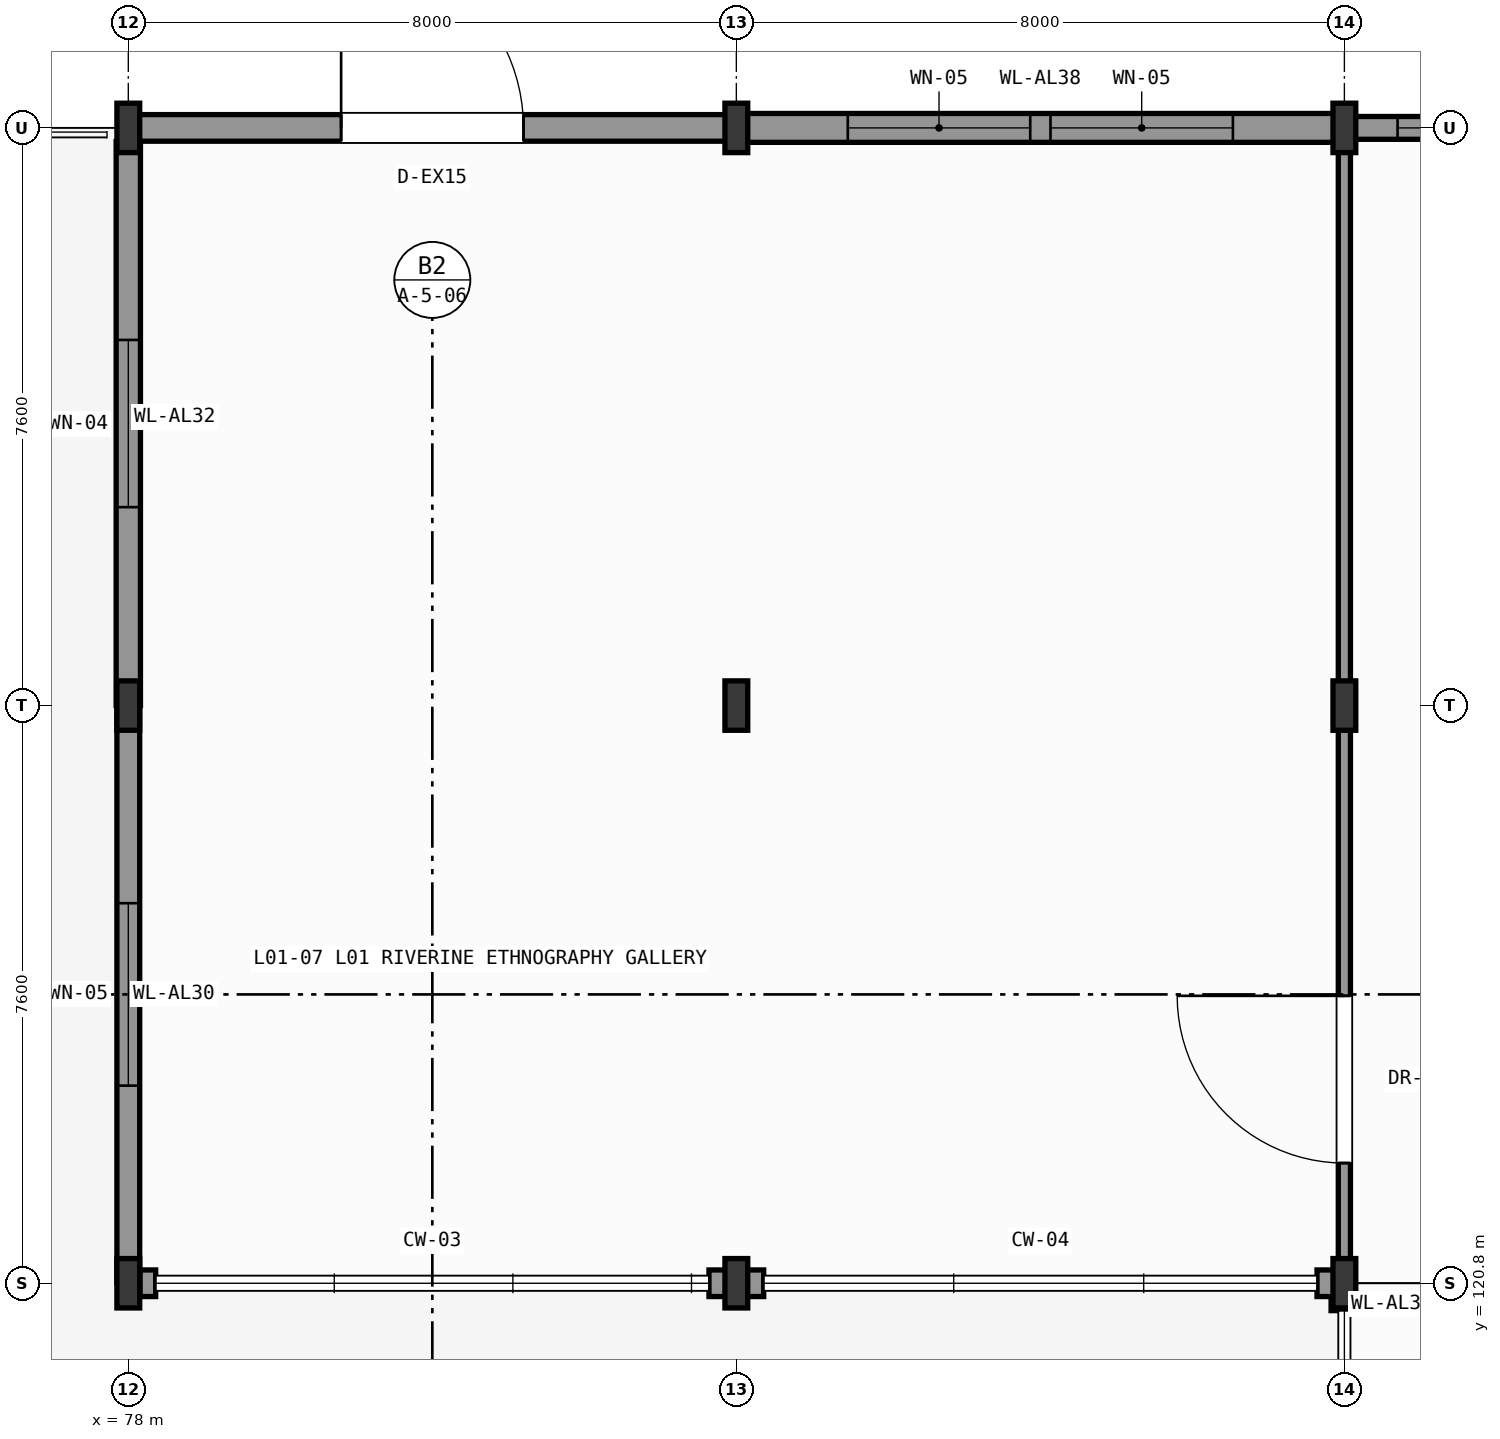
"""IFC4 building model, lengths in metres.
Left out: names, types, materials, properties, quantities, classifications, styles, units other than length and angle.
Written with IfcOpenShell. Run it as: python <this file> out.ifc"""

import sys

from ifc_helpers import new_model, si_unit, direction, frame, frame_2d, origin, origin_2d, place, context, subcontext, project, spatial, rectangle, i_section, extrude, element, fill, save


model = new_model("IFC4")
c1 = context("Model", 3, precision=1e-05, world=origin(), true_north=direction((0.0, 1.0)))
c2 = subcontext(c1, "Body", "Model", "MODEL_VIEW")
j1 = project(units=[si_unit("LENGTHUNIT", "METRE"), si_unit("PLANEANGLEUNIT", "RADIAN")], contexts=[c1])
p1 = place(None, origin())
s1 = spatial("IfcSite", under=j1, at=p1, CompositionType="ELEMENT")
p2 = place(p1, origin())
s2 = spatial("IfcBuilding", under=s1, at=p2, CompositionType="ELEMENT")
p3 = place(p2, origin())
s3 = spatial("IfcBuildingStorey", under=s2, at=p3, CompositionType="ELEMENT", Elevation=0.0)
for number, where, z_axis, x_axis in (
    (1, (78.0, 120.8, 0.0), (0.0, 0.0, 1.0), (1.0, 0.0, 0.0)),
    (2, (78.0, 128.4, 0.0), (0.0, 0.0, 1.0), (1.0, 0.0, 0.0)),
    (3, (78.0, 136.0, 0.0), (0.0, 0.0, 1.0), (1.0, 0.0, 0.0)),
    (4, (86.0, 120.8, 0.0), (0.0, 0.0, 1.0), (1.0, 0.0, 0.0)),
    (5, (86.0, 128.4, 0.0), (0.0, 0.0, 1.0), (1.0, 0.0, 0.0)),
    (6, (86.0, 136.0, 0.0), (0.0, 0.0, 1.0), (1.0, 0.0, 0.0)),
    (7, (94.0, 120.8, 0.0), (0.0, 0.0, 1.0), (1.0, 0.0, 0.0)),
    (8, (94.0, 128.4, 0.0), (0.0, 0.0, 1.0), (1.0, 0.0, 0.0)),
    (9, (94.0, 136.0, 0.0), (0.0, 0.0, 1.0), (1.0, 0.0, 0.0)),
):
    element("IfcColumn", number, at=place(p3, frame(where, z_axis=z_axis, x_axis=x_axis)), inside=s3, PredefinedType="COLUMN", context=c2, shape_type="SweptSolid", body=[
        extrude(i_section(OverallWidth=0.3, OverallDepth=0.65, WebThickness=0.016, FlangeThickness=0.031, FilletRadius=0.027, at=origin_2d()), origin(), (0.0, 0.0, 1.0), 7.8),
    ])
p4 = place(p3, frame((94.0, 136.0, 0.0), z_axis=(0.0, 0.0, 1.0), x_axis=(1.0, 0.0, 0.0)))
e10 = element("IfcWall", 10, at=p4, inside=s3, PredefinedType="SOLIDWALL", context=c2, shape_type="SweptSolid", body=[
    extrude(rectangle(XDim=8.0, YDim=0.3, at=frame_2d((4.0, 0.0))), origin(), (0.0, 0.0, 1.0), 7.135),
])
p5 = place(p4, frame((0.7, 0.0, 0.95)))
e11 = element("IfcOpeningElement", 11, at=p5, cuts=e10, PredefinedType="OPENING", context=c2, shape_type="SweptSolid", body=[
    extrude(rectangle(XDim=2.4, YDim=3.0, at=frame_2d((1.2, 1.5))), frame((0.0, 0.16, 0.0), z_axis=(0.0, -1.0, 0.0), x_axis=(1.0, 0.0, 0.0)), (0.0, 0.0, 1.0), 0.32),
])
p6 = place(p4, frame((4.1, 0.0, 0.95)))
e12 = element("IfcOpeningElement", 12, at=p6, cuts=e10, PredefinedType="OPENING", context=c2, shape_type="SweptSolid", body=[
    extrude(rectangle(XDim=2.4, YDim=3.0, at=frame_2d((1.2, 1.5))), frame((0.0, 0.16, 0.0), z_axis=(0.0, -1.0, 0.0), x_axis=(1.0, 0.0, 0.0)), (0.0, 0.0, 1.0), 0.32),
])
p7 = place(p3, frame((86.0, 136.0, 0.0), z_axis=(0.0, 0.0, 1.0), x_axis=(1.0, 0.0, 0.0)))
e13 = element("IfcWall", 13, at=p7, inside=s3, PredefinedType="SOLIDWALL", context=c2, shape_type="SweptSolid", body=[
    extrude(rectangle(XDim=8.0, YDim=0.38, at=frame_2d((4.0, 0.0))), origin(), (0.0, 0.0, 1.0), 7.135),
])
p8 = place(p7, frame((1.467, 0.0, 0.95)))
e14 = element("IfcOpeningElement", 14, at=p8, cuts=e13, PredefinedType="OPENING", context=c2, shape_type="SweptSolid", body=[
    extrude(rectangle(XDim=2.4, YDim=4.6, at=frame_2d((1.2, 2.3))), frame((0.0, 0.2, 0.0), z_axis=(0.0, -1.0, 0.0), x_axis=(1.0, 0.0, 0.0)), (0.0, 0.0, 1.0), 0.4),
])
p9 = place(p7, frame((4.133, 0.0, 0.95)))
e15 = element("IfcOpeningElement", 15, at=p9, cuts=e13, PredefinedType="OPENING", context=c2, shape_type="SweptSolid", body=[
    extrude(rectangle(XDim=2.4, YDim=4.6, at=frame_2d((1.2, 2.3))), frame((0.0, 0.2, 0.0), z_axis=(0.0, -1.0, 0.0), x_axis=(1.0, 0.0, 0.0)), (0.0, 0.0, 1.0), 0.4),
])
p10 = place(p3, frame((78.0, 136.0, 0.0), z_axis=(0.0, 0.0, 1.0), x_axis=(1.0, 0.0, 0.0)))
e16 = element("IfcWall", 16, at=p10, inside=s3, PredefinedType="SOLIDWALL", context=c2, shape_type="SweptSolid", body=[
    extrude(rectangle(XDim=8.0, YDim=0.35, at=frame_2d((4.0, 0.0))), origin(), (0.0, 0.0, 1.0), 7.135),
])
p11 = place(p10, frame((2.8, 0.0, 0.0)))
e17 = element("IfcOpeningElement", 17, at=p11, cuts=e16, PredefinedType="OPENING", context=c2, shape_type="SweptSolid", body=[
    extrude(rectangle(XDim=2.4, YDim=2.8, at=frame_2d((1.2, 1.4))), frame((0.0, 0.185, 0.0), z_axis=(0.0, -1.0, 0.0), x_axis=(1.0, 0.0, 0.0)), (0.0, 0.0, 1.0), 0.37),
])
p12 = place(p3, frame((78.0, 128.4, 0.0), z_axis=(0.0, 0.0, 1.0), x_axis=(0.0, 1.0, 0.0)))
e18 = element("IfcWall", 18, at=p12, inside=s3, PredefinedType="SOLIDWALL", context=c2, shape_type="SweptSolid", body=[
    extrude(rectangle(XDim=7.421, YDim=0.32, at=frame_2d((3.71, 0.0))), origin(), (0.0, 0.0, 1.0), 7.025),
])
p13 = place(p12, frame((2.611, 0.0, 0.95)))
e19 = element("IfcOpeningElement", 19, at=p13, cuts=e18, PredefinedType="OPENING", context=c2, shape_type="SweptSolid", body=[
    extrude(rectangle(XDim=2.2, YDim=4.2, at=frame_2d((1.1, 2.1))), frame((0.0, 0.17, 0.0), z_axis=(0.0, -1.0, 0.0), x_axis=(1.0, 0.0, 0.0)), (0.0, 0.0, 1.0), 0.34),
])
p14 = place(p3, frame((78.0, 120.8, 0.0), z_axis=(0.0, 0.0, 1.0), x_axis=(0.0, 1.0, 0.0)))
e20 = element("IfcWall", 20, at=p14, inside=s3, PredefinedType="SOLIDWALL", context=c2, shape_type="SweptSolid", body=[
    extrude(rectangle(XDim=7.6, YDim=0.3, at=frame_2d((3.8, 0.0))), origin(), (0.0, 0.0, 1.0), 7.025),
])
p15 = place(p14, frame((2.6, 0.0, 0.95)))
e21 = element("IfcOpeningElement", 21, at=p15, cuts=e20, PredefinedType="OPENING", context=c2, shape_type="SweptSolid", body=[
    extrude(rectangle(XDim=2.4, YDim=4.6, at=frame_2d((1.2, 2.3))), frame((0.0, 0.16, 0.0), z_axis=(0.0, -1.0, 0.0), x_axis=(1.0, 0.0, 0.0)), (0.0, 0.0, 1.0), 0.32),
])
p16 = place(p3, frame((78.154, 120.8, 0.0), z_axis=(0.0, 0.0, 1.0), x_axis=(1.0, 0.0, 0.0)))
e22 = element("IfcWall", 22, at=p16, inside=s3, PredefinedType="SOLIDWALL", context=c2, shape_type="SweptSolid", body=[
    extrude(rectangle(XDim=0.206, YDim=0.35, at=frame_2d((0.103, 0.0))), origin(), (0.0, 0.0, 1.0), 7.54),
])
p17 = place(p3, frame((85.64, 120.8, 0.0), z_axis=(0.0, 0.0, 1.0), x_axis=(1.0, 0.0, 0.0)))
e23 = element("IfcWall", 23, at=p17, inside=s3, PredefinedType="SOLIDWALL", context=c2, shape_type="SweptSolid", body=[
    extrude(rectangle(XDim=0.36, YDim=0.35, at=frame_2d((0.18, 0.0))), origin(), (0.0, 0.0, 1.0), 7.295),
])
for number, where, z_axis, x_axis in (
    (24, (86.0, 120.8, 0.0), (0.0, 0.0, 1.0), (1.0, 0.0, 0.0)),
    (25, (93.64, 120.8, 0.0), (0.0, 0.0, 1.0), (1.0, 0.0, 0.0)),
):
    element("IfcWall", number, at=place(p3, frame(where, z_axis=z_axis, x_axis=x_axis)), inside=s3, PredefinedType="SOLIDWALL", context=c2, shape_type="SweptSolid", body=[
        extrude(rectangle(XDim=0.36, YDim=0.35, at=frame_2d((0.18, 0.0))), origin(), (0.0, 0.0, 1.0), 7.225),
    ])
p18 = place(p3, frame((94.0, 120.621, 0.0), z_axis=(0.0, 0.0, 1.0), x_axis=(0.0, -1.0, 0.0)))
e26 = element("IfcWall", 26, at=p18, inside=s3, PredefinedType="SOLIDWALL", context=c2, shape_type="SweptSolid", body=[
    extrude(rectangle(XDim=0.181, YDim=0.35, at=frame_2d((0.091, 0.0))), origin(), (0.0, 0.0, 1.0), 7.54),
])
p19 = place(p3, frame((94.0, 120.979, 0.0), z_axis=(0.0, 0.0, 1.0), x_axis=(0.0, 1.0, 0.0)))
e27 = element("IfcWall", 27, at=p19, inside=s3, PredefinedType="PARTITIONING", context=c2, shape_type="SweptSolid", body=[
    extrude(rectangle(XDim=14.827, YDim=0.16, at=frame_2d((7.414, 0.0))), origin(), (0.0, 0.0, 1.0), 7.025),
])
p20 = place(p19, frame((1.402, 0.0, 0.0)))
e28 = element("IfcOpeningElement", 28, at=p20, cuts=e27, PredefinedType="OPENING", context=c2, shape_type="SweptSolid", body=[
    extrude(rectangle(XDim=2.2, YDim=2.6, at=frame_2d((1.1, 1.3))), frame((0.0, 0.09, 0.0), z_axis=(0.0, -1.0, 0.0), x_axis=(1.0, 0.0, 0.0)), (0.0, 0.0, 1.0), 0.18),
])
p21 = place(p5, origin())
e29 = element("IfcWindow", 29, at=p21, inside=s3, PartitioningType="SINGLE_PANEL", PredefinedType="WINDOW", context=c2, shape_type="SweptSolid", body=[
    extrude(rectangle(XDim=2.4, YDim=3.0, at=frame_2d((1.2, 1.5))), frame((0.0, 0.03, 0.0), z_axis=(0.0, -1.0, 0.0), x_axis=(1.0, 0.0, 0.0)), (0.0, 0.0, 1.0), 0.06),
])
fill(e11, e29)
p22 = place(p8, origin())
e30 = element("IfcWindow", 30, at=p22, inside=s3, PartitioningType="SINGLE_PANEL", PredefinedType="WINDOW", context=c2, shape_type="SweptSolid", body=[
    extrude(rectangle(XDim=2.4, YDim=4.6, at=frame_2d((1.2, 2.3))), frame((0.0, 0.03, 0.0), z_axis=(0.0, -1.0, 0.0), x_axis=(1.0, 0.0, 0.0)), (0.0, 0.0, 1.0), 0.06),
])
fill(e14, e30)
p23 = place(p9, origin())
e31 = element("IfcWindow", 31, at=p23, inside=s3, PartitioningType="SINGLE_PANEL", PredefinedType="WINDOW", context=c2, shape_type="SweptSolid", body=[
    extrude(rectangle(XDim=2.4, YDim=4.6, at=frame_2d((1.2, 2.3))), frame((0.0, 0.03, 0.0), z_axis=(0.0, -1.0, 0.0), x_axis=(1.0, 0.0, 0.0)), (0.0, 0.0, 1.0), 0.06),
])
fill(e15, e31)
p24 = place(p11, origin())
e32 = element("IfcDoor", 32, at=p24, inside=s3, OperationType="SINGLE_SWING_LEFT", PredefinedType="DOOR", context=c2, shape_type="SweptSolid", body=[
    extrude(rectangle(XDim=2.4, YDim=2.8, at=frame_2d((1.2, 1.4))), frame((0.0, 0.025, 0.0), z_axis=(0.0, -1.0, 0.0), x_axis=(1.0, 0.0, 0.0)), (0.0, 0.0, 1.0), 0.05),
])
fill(e17, e32)
p25 = place(p13, origin())
e33 = element("IfcWindow", 33, at=p25, inside=s3, PartitioningType="SINGLE_PANEL", PredefinedType="WINDOW", context=c2, shape_type="SweptSolid", body=[
    extrude(rectangle(XDim=2.2, YDim=4.2, at=frame_2d((1.1, 2.1))), frame((0.0, 0.03, 0.0), z_axis=(0.0, -1.0, 0.0), x_axis=(1.0, 0.0, 0.0)), (0.0, 0.0, 1.0), 0.06),
])
fill(e19, e33)
p26 = place(p15, origin())
e34 = element("IfcWindow", 34, at=p26, inside=s3, PartitioningType="SINGLE_PANEL", PredefinedType="WINDOW", context=c2, shape_type="SweptSolid", body=[
    extrude(rectangle(XDim=2.4, YDim=4.6, at=frame_2d((1.2, 2.3))), frame((0.0, 0.03, 0.0), z_axis=(0.0, -1.0, 0.0), x_axis=(1.0, 0.0, 0.0)), (0.0, 0.0, 1.0), 0.06),
])
fill(e21, e34)
p27 = place(p20, origin())
e35 = element("IfcDoor", 35, at=p27, inside=s3, OperationType="SINGLE_SWING_RIGHT", PredefinedType="DOOR", context=c2, shape_type="SweptSolid", body=[
    extrude(rectangle(XDim=2.2, YDim=2.6, at=frame_2d((1.1, 1.3))), frame((0.0, 0.025, 0.0), z_axis=(0.0, -1.0, 0.0), x_axis=(1.0, 0.0, 0.0)), (0.0, 0.0, 1.0), 0.05),
])
fill(e28, e35)
save(model, sys.argv[1])
